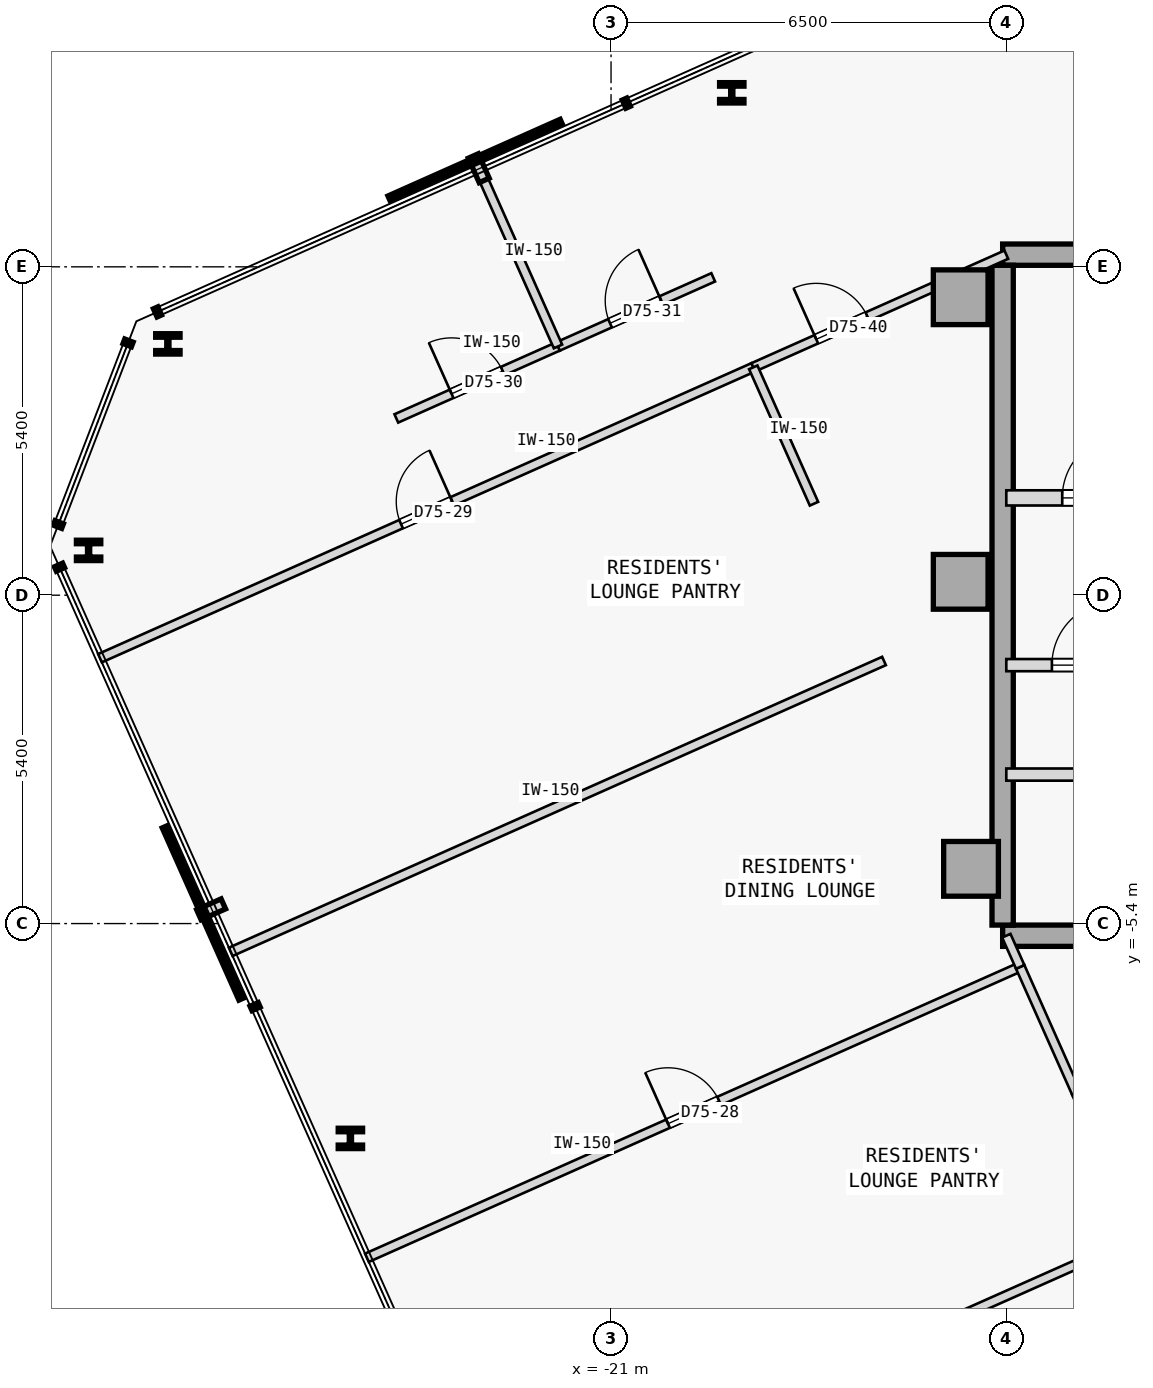
"""IFC4 building model, lengths in metres.
Left out: names, types, materials, properties, quantities, classifications, styles, units other than length and angle.
Written with IfcOpenShell. Run it as: python <this file> out.ifc"""

import sys

from ifc_helpers import new_model, si_unit, direction, frame, frame_2d, origin, origin_2d, place, context, subcontext, project, spatial, rectangle, i_section, extrude, element, fill, save


model = new_model("IFC4")
c1 = context("Model", 3, precision=1e-05, world=origin(), true_north=direction((0.0, 1.0)))
c2 = subcontext(c1, "Body", "Model", "MODEL_VIEW")
j1 = project(units=[si_unit("LENGTHUNIT", "METRE"), si_unit("PLANEANGLEUNIT", "RADIAN")], contexts=[c1])
p1 = place(None, origin())
s1 = spatial("IfcSite", under=j1, at=p1, CompositionType="ELEMENT")
p2 = place(p1, origin())
s2 = spatial("IfcBuilding", under=s1, at=p2, CompositionType="ELEMENT")
p3 = place(p2, frame((0.0, 0.0, 281.9)))
s3 = spatial("IfcBuildingStorey", under=s2, at=p3, CompositionType="ELEMENT", Elevation=281.9)
for number, where, z_axis, x_axis in (
    (1, (-15.25, 4.9, 0.0), (0.0, 0.0, 1.0), (1.0, 0.0, 0.0)),
    (2, (-15.25, 0.22, 0.0), (0.0, 0.0, 1.0), (1.0, 0.0, 0.0)),
    (3, (-15.08, -4.5, 0.0), (0.0, 0.0, 1.0), (1.0, 0.0, 0.0)),
):
    element("IfcColumn", number, at=place(p3, frame(where, z_axis=z_axis, x_axis=x_axis)), inside=s3, PredefinedType="COLUMN", context=c2, shape_type="SweptSolid", body=[
        extrude(rectangle(XDim=0.9, YDim=0.9, at=origin_2d()), origin(), (0.0, 0.0, 1.0), 3.35),
    ])
p4 = place(p3, frame((-14.56, 5.6, 0.0), z_axis=(0.0, 0.0, 1.0), x_axis=(1.0, 0.0, 0.0)))
e4 = element("IfcWall", 4, at=p4, inside=s3, PredefinedType="SHEAR", context=c2, shape_type="SweptSolid", body=[
    extrude(rectangle(XDim=11.41, YDim=0.35, at=frame_2d((5.705, 0.0))), origin(), (0.0, 0.0, 1.0), 3.125),
])
p5 = place(p3, frame((-14.56, -5.6, 0.0), z_axis=(0.0, 0.0, 1.0), x_axis=(1.0, 0.0, 0.0)))
e5 = element("IfcWall", 5, at=p5, inside=s3, PredefinedType="SHEAR", context=c2, shape_type="SweptSolid", body=[
    extrude(rectangle(XDim=10.86, YDim=0.35, at=frame_2d((5.43, 0.0))), origin(), (0.0, 0.0, 1.0), 3.125),
])
p6 = place(p3, frame((-14.56, -5.425, 0.0), z_axis=(0.0, 0.0, 1.0), x_axis=(0.0, 1.0, 0.0)))
e6 = element("IfcWall", 6, at=p6, inside=s3, PredefinedType="SHEAR", context=c2, shape_type="SweptSolid", body=[
    extrude(rectangle(XDim=10.85, YDim=0.35, at=frame_2d((5.425, 0.0))), origin(), (0.0, 0.0, 1.0), 3.125),
])
for number, where, z_axis, x_axis in (
    (7, (-19.015, 8.262, 0.0), (0.0, 0.0, 1.0), (1.0, 0.0, 0.0)),
    (8, (-28.288, 4.133, 0.0), (0.0, 0.0, 1.0), (1.0, 0.0, 0.0)),
    (9, (-29.592, 0.737, 0.0), (0.0, 0.0, 1.0), (1.0, 0.0, 0.0)),
    (10, (-25.286, -8.933, 0.0), (0.0, 0.0, 1.0), (1.0, 0.0, 0.0)),
):
    element("IfcColumn", number, at=place(p3, frame(where, z_axis=z_axis, x_axis=x_axis)), inside=s3, PredefinedType="COLUMN", context=c2, shape_type="SweptSolid", body=[
        extrude(i_section(OverallWidth=0.401, OverallDepth=0.335, WebThickness=0.036, FlangeThickness=0.058, FilletRadius=0.015, at=origin_2d()), origin(), (0.0, 0.0, 1.0), 3.35),
    ])
p7 = place(p3, frame((-14.5, 1.6, 0.0), z_axis=(0.0, 0.0, 1.0), x_axis=(1.0, 0.0, 0.0)))
e11 = element("IfcWall", 11, at=p7, inside=s3, PredefinedType="STANDARD", context=c2, shape_type="SweptSolid", body=[
    extrude(rectangle(XDim=3.6, YDim=0.25, at=frame_2d((1.8, 0.0))), origin(), (0.0, 0.0, 1.0), 3.125),
])
p8 = place(p7, frame((0.92, 0.0, 0.0)))
e12 = element("IfcOpeningElement", 12, at=p8, cuts=e11, PredefinedType="OPENING", context=c2, shape_type="SweptSolid", body=[
    extrude(rectangle(XDim=1.05, YDim=2.15, at=frame_2d((0.525, 1.075))), frame((0.0, 0.135, 0.0), z_axis=(0.0, -1.0, 0.0), x_axis=(1.0, 0.0, 0.0)), (0.0, 0.0, 1.0), 0.27),
])
p9 = place(p3, frame((-14.5, -1.15, 0.0), z_axis=(0.0, 0.0, 1.0), x_axis=(1.0, 0.0, 0.0)))
e13 = element("IfcWall", 13, at=p9, inside=s3, PredefinedType="STANDARD", context=c2, shape_type="SweptSolid", body=[
    extrude(rectangle(XDim=2.95, YDim=0.2, at=frame_2d((1.475, 0.0))), origin(), (0.0, 0.0, 1.0), 3.125),
])
p10 = place(p9, frame((0.75, 0.0, 0.0)))
e14 = element("IfcOpeningElement", 14, at=p10, cuts=e13, PredefinedType="OPENING", context=c2, shape_type="SweptSolid", body=[
    extrude(rectangle(XDim=1.05, YDim=2.18, at=frame_2d((0.525, 1.09))), frame((0.0, 0.11, 0.0), z_axis=(0.0, -1.0, 0.0), x_axis=(1.0, 0.0, 0.0)), (0.0, 0.0, 1.0), 0.22),
])
p11 = place(p3, frame((-14.5, -2.95, 0.0), z_axis=(0.0, 0.0, 1.0), x_axis=(1.0, 0.0, 0.0)))
e15 = element("IfcWall", 15, at=p11, inside=s3, PredefinedType="STANDARD", context=c2, shape_type="SweptSolid", body=[
    extrude(rectangle(XDim=10.8, YDim=0.2, at=frame_2d((5.4, 0.0))), origin(), (0.0, 0.0, 1.0), 3.125),
])
p12 = place(p11, frame((9.17, 0.0, 0.0)))
e16 = element("IfcOpeningElement", 16, at=p12, cuts=e15, PredefinedType="OPENING", context=c2, shape_type="SweptSolid", body=[
    extrude(rectangle(XDim=1.1, YDim=2.15, at=frame_2d((0.55, 1.075))), frame((0.0, 0.11, 0.0), z_axis=(0.0, -1.0, 0.0), x_axis=(1.0, 0.0, 0.0)), (0.0, 0.0, 1.0), 0.22),
])
p13 = place(p11, frame((2.33, 0.0, 0.0)))
e17 = element("IfcOpeningElement", 17, at=p13, cuts=e15, PredefinedType="OPENING", context=c2, shape_type="SweptSolid", body=[
    extrude(rectangle(XDim=0.92, YDim=2.15, at=frame_2d((0.46, 1.075))), frame((0.0, 0.11, 0.0), z_axis=(0.0, -1.0, 0.0), x_axis=(1.0, 0.0, 0.0)), (0.0, 0.0, 1.0), 0.22),
])
p14 = place(p11, frame((6.65, 0.0, 0.0)))
e18 = element("IfcOpeningElement", 18, at=p14, cuts=e15, PredefinedType="OPENING", context=c2, shape_type="SweptSolid", body=[
    extrude(rectangle(XDim=0.92, YDim=2.15, at=frame_2d((0.46, 1.075))), frame((0.0, 0.11, 0.0), z_axis=(0.0, -1.0, 0.0), x_axis=(1.0, 0.0, 0.0)), (0.0, 0.0, 1.0), 0.22),
])
p15 = place(p3, frame((-29.404, -1.036, 0.0), z_axis=(0.0, 0.0, 1.0), x_axis=(0.913544247064, 0.406739362069, 0.0)))
e19 = element("IfcWall", 19, at=p15, inside=s3, PredefinedType="PARTITIONING", context=c2, shape_type="SweptSolid", body=[
    extrude(rectangle(XDim=11.76, YDim=0.15, at=frame_2d((5.88, 0.0))), origin(), (0.0, 0.0, 1.0), 3.125),
])
p16 = place(p15, frame((5.42, 0.0, 0.0)))
e20 = element("IfcOpeningElement", 20, at=p16, cuts=e19, PredefinedType="OPENING", context=c2, shape_type="SweptSolid", body=[
    extrude(rectangle(XDim=0.92, YDim=2.15, at=frame_2d((0.46, 1.075))), frame((0.0, 0.085, 0.0), z_axis=(0.0, -1.0, 0.0), x_axis=(1.0, 0.0, 0.0)), (0.0, 0.0, 1.0), 0.17),
])
p17 = place(p3, frame((-24.531, 2.907, 0.0), z_axis=(0.0, 0.0, 1.0), x_axis=(0.913531130744, 0.406768820292, 0.0)))
e21 = element("IfcWall", 21, at=p17, inside=s3, PredefinedType="PARTITIONING", context=c2, shape_type="SweptSolid", body=[
    extrude(rectangle(XDim=2.91, YDim=0.15, at=frame_2d((1.455, 0.0))), origin(), (0.0, 0.0, 1.0), 3.125),
])
p18 = place(p17, frame((0.995, 0.0, 0.0)))
e22 = element("IfcOpeningElement", 22, at=p18, cuts=e21, PredefinedType="OPENING", context=c2, shape_type="SweptSolid", body=[
    extrude(rectangle(XDim=0.92, YDim=2.15, at=frame_2d((0.46, 1.075))), frame((0.0, 0.085, 0.0), z_axis=(0.0, -1.0, 0.0), x_axis=(1.0, 0.0, 0.0)), (0.0, 0.0, 1.0), 0.17),
])
p19 = place(p3, frame((-21.872, 4.091, 0.0), z_axis=(0.0, 0.0, 1.0), x_axis=(0.913559116966, 0.406705962346, 0.0)))
e23 = element("IfcWall", 23, at=p19, inside=s3, PredefinedType="PARTITIONING", context=c2, shape_type="SweptSolid", body=[
    extrude(rectangle(XDim=2.794, YDim=0.15, at=frame_2d((1.397, 0.0))), origin(), (0.0, 0.0, 1.0), 3.125),
])
p20 = place(p19, frame((0.937, 0.0, 0.0)))
e24 = element("IfcOpeningElement", 24, at=p20, cuts=e23, PredefinedType="OPENING", context=c2, shape_type="SweptSolid", body=[
    extrude(rectangle(XDim=0.92, YDim=2.15, at=frame_2d((0.46, 1.075))), frame((0.0, 0.085, 0.0), z_axis=(0.0, -1.0, 0.0), x_axis=(1.0, 0.0, 0.0)), (0.0, 0.0, 1.0), 0.17),
])
p21 = place(p3, frame((-18.661, 3.747, 0.0), z_axis=(0.0, 0.0, 1.0), x_axis=(0.913535055583, 0.40676000568, 0.0)))
e25 = element("IfcWall", 25, at=p21, inside=s3, PredefinedType="PARTITIONING", context=c2, shape_type="SweptSolid", body=[
    extrude(rectangle(XDim=4.555, YDim=0.15, at=frame_2d((2.277, 0.0))), origin(), (0.0, 0.0, 1.0), 3.125),
])
p22 = place(p21, frame((1.134, 0.0, 0.0)))
e26 = element("IfcOpeningElement", 26, at=p22, cuts=e25, PredefinedType="OPENING", context=c2, shape_type="SweptSolid", body=[
    extrude(rectangle(XDim=0.92, YDim=2.15, at=frame_2d((0.46, 1.075))), frame((0.0, 0.085, 0.0), z_axis=(0.0, -1.0, 0.0), x_axis=(1.0, 0.0, 0.0)), (0.0, 0.0, 1.0), 0.17),
])
p23 = place(p3, frame((-23.043, -15.323, 0.0), z_axis=(0.0, 0.0, 1.0), x_axis=(0.913547681516, 0.406731648137, 0.0)))
e27 = element("IfcWall", 27, at=p23, inside=s3, PredefinedType="PARTITIONING", context=c2, shape_type="SweptSolid", body=[
    extrude(rectangle(XDim=11.76, YDim=0.15, at=frame_2d((5.88, 0.0))), origin(), (0.0, 0.0, 1.0), 3.125),
])
p24 = place(p23, frame((5.42, 0.0, 0.0)))
e28 = element("IfcOpeningElement", 28, at=p24, cuts=e27, PredefinedType="OPENING", context=c2, shape_type="SweptSolid", body=[
    extrude(rectangle(XDim=0.92, YDim=2.15, at=frame_2d((0.46, 1.075))), frame((0.0, 0.085, 0.0), z_axis=(0.0, -1.0, 0.0), x_axis=(1.0, 0.0, 0.0)), (0.0, 0.0, 1.0), 0.17),
])
p25 = place(p3, frame((-25.014, -10.896, 0.0), z_axis=(0.0, 0.0, 1.0), x_axis=(0.913544247064, 0.406739362069, 0.0)))
e29 = element("IfcWall", 29, at=p25, inside=s3, PredefinedType="PARTITIONING", context=c2, shape_type="SweptSolid", body=[
    extrude(rectangle(XDim=11.76, YDim=0.15, at=frame_2d((5.88, 0.0))), origin(), (0.0, 0.0, 1.0), 3.125),
])
p26 = place(p25, frame((5.42, 0.0, 0.0)))
e30 = element("IfcOpeningElement", 30, at=p26, cuts=e29, PredefinedType="OPENING", context=c2, shape_type="SweptSolid", body=[
    extrude(rectangle(XDim=0.92, YDim=2.15, at=frame_2d((0.46, 1.075))), frame((0.0, 0.085, 0.0), z_axis=(0.0, -1.0, 0.0), x_axis=(1.0, 0.0, 0.0)), (0.0, 0.0, 1.0), 0.17),
])
p27 = place(p3, frame((-12.3, -10.54, 0.0), z_axis=(0.0, 0.0, 1.0), x_axis=(-0.406788806475, 0.913522231216, 0.0)))
e31 = element("IfcWall", 31, at=p27, inside=s3, PredefinedType="PARTITIONING", context=c2, shape_type="SweptSolid", body=[
    extrude(rectangle(XDim=2.577, YDim=0.15, at=frame_2d((1.289, 0.0))), origin(), (0.0, 0.0, 1.0), 3.125),
])
p28 = place(p3, frame((-13.348, -8.186, 0.0), z_axis=(0.0, 0.0, 1.0), x_axis=(-0.40673740295, 0.913545119324, 0.0)))
e32 = element("IfcWall", 32, at=p28, inside=s3, PredefinedType="PARTITIONING", context=c2, shape_type="SweptSolid", body=[
    extrude(rectangle(XDim=2.269, YDim=0.15, at=frame_2d((1.134, 0.0))), origin(), (0.0, 0.0, 1.0), 3.125),
])
p29 = place(p3, frame((-27.254, -5.865, 0.0), z_axis=(0.0, 0.0, 1.0), x_axis=(0.913547681516, 0.406731648137, 0.0)))
e33 = element("IfcWall", 33, at=p29, inside=s3, PredefinedType="PARTITIONING", context=c2, shape_type="SweptSolid", body=[
    extrude(rectangle(XDim=11.76, YDim=0.15, at=frame_2d((5.88, 0.0))), origin(), (0.0, 0.0, 1.0), 3.125),
])
p30 = place(p3, frame((-14.271, -6.113, 0.0), z_axis=(0.0, 0.0, 1.0), x_axis=(-0.406622099206, 0.913596447255, 0.0)))
e34 = element("IfcWall", 34, at=p30, inside=s3, PredefinedType="PARTITIONING", context=c2, shape_type="SweptSolid", body=[
    extrude(rectangle(XDim=0.562, YDim=0.15, at=frame_2d((0.281, 0.0))), origin(), (0.0, 0.0, 1.0), 3.125),
])
p31 = place(p3, frame((-17.663, 1.504, 0.0), z_axis=(0.0, 0.0, 1.0), x_axis=(-0.406747374275, 0.913540679729, 0.0)))
e35 = element("IfcWall", 35, at=p31, inside=s3, PredefinedType="PARTITIONING", context=c2, shape_type="SweptSolid", body=[
    extrude(rectangle(XDim=2.455, YDim=0.15, at=frame_2d((1.228, 0.0))), origin(), (0.0, 0.0, 1.0), 3.125),
])
p32 = place(p3, frame((-21.872, 4.091, 0.0), z_axis=(0.0, 0.0, 1.0), x_axis=(-0.406761717745, 0.913534293268, 0.0)))
e36 = element("IfcWall", 36, at=p32, inside=s3, PredefinedType="PARTITIONING", context=c2, shape_type="SweptSolid", body=[
    extrude(rectangle(XDim=3.198, YDim=0.15, at=frame_2d((1.599, 0.0))), origin(), (0.0, 0.0, 1.0), 3.125),
])
p33 = place(p8, origin())
e37 = element("IfcDoor", 37, at=p33, inside=s3, OperationType="SINGLE_SWING_RIGHT", PredefinedType="DOOR", context=c2, shape_type="SweptSolid", body=[
    extrude(rectangle(XDim=1.05, YDim=2.15, at=frame_2d((0.525, 1.075))), frame((0.0, 0.025, 0.0), z_axis=(0.0, -1.0, 0.0), x_axis=(1.0, 0.0, 0.0)), (0.0, 0.0, 1.0), 0.05),
])
fill(e12, e37)
p34 = place(p10, origin())
e38 = element("IfcDoor", 38, at=p34, inside=s3, OperationType="SINGLE_SWING_RIGHT", PredefinedType="DOOR", context=c2, shape_type="SweptSolid", body=[
    extrude(rectangle(XDim=1.05, YDim=2.18, at=frame_2d((0.525, 1.09))), frame((0.0, 0.025, 0.0), z_axis=(0.0, -1.0, 0.0), x_axis=(1.0, 0.0, 0.0)), (0.0, 0.0, 1.0), 0.05),
])
fill(e14, e38)
p35 = place(p26, origin())
e39 = element("IfcDoor", 39, at=p35, inside=s3, OperationType="SINGLE_SWING_LEFT", PredefinedType="DOOR", context=c2, shape_type="SweptSolid", body=[
    extrude(rectangle(XDim=0.92, YDim=2.15, at=frame_2d((0.46, 1.075))), frame((0.0, 0.025, 0.0), z_axis=(0.0, -1.0, 0.0), x_axis=(1.0, 0.0, 0.0)), (0.0, 0.0, 1.0), 0.05),
])
fill(e30, e39)
p36 = place(p16, origin())
e40 = element("IfcDoor", 40, at=p36, inside=s3, OperationType="SINGLE_SWING_RIGHT", PredefinedType="DOOR", context=c2, shape_type="SweptSolid", body=[
    extrude(rectangle(XDim=0.92, YDim=2.15, at=frame_2d((0.46, 1.075))), frame((0.0, 0.025, 0.0), z_axis=(0.0, -1.0, 0.0), x_axis=(1.0, 0.0, 0.0)), (0.0, 0.0, 1.0), 0.05),
])
fill(e20, e40)
p37 = place(p18, origin())
e41 = element("IfcDoor", 41, at=p37, inside=s3, OperationType="SINGLE_SWING_LEFT", PredefinedType="DOOR", context=c2, shape_type="SweptSolid", body=[
    extrude(rectangle(XDim=0.92, YDim=2.15, at=frame_2d((0.46, 1.075))), frame((0.0, 0.025, 0.0), z_axis=(0.0, -1.0, 0.0), x_axis=(1.0, 0.0, 0.0)), (0.0, 0.0, 1.0), 0.05),
])
fill(e22, e41)
p38 = place(p20, origin())
e42 = element("IfcDoor", 42, at=p38, inside=s3, OperationType="SINGLE_SWING_RIGHT", PredefinedType="DOOR", context=c2, shape_type="SweptSolid", body=[
    extrude(rectangle(XDim=0.92, YDim=2.15, at=frame_2d((0.46, 1.075))), frame((0.0, 0.025, 0.0), z_axis=(0.0, -1.0, 0.0), x_axis=(1.0, 0.0, 0.0)), (0.0, 0.0, 1.0), 0.05),
])
fill(e24, e42)
p39 = place(p22, origin())
e43 = element("IfcDoor", 43, at=p39, inside=s3, OperationType="SINGLE_SWING_LEFT", PredefinedType="DOOR", context=c2, shape_type="SweptSolid", body=[
    extrude(rectangle(XDim=0.92, YDim=2.15, at=frame_2d((0.46, 1.075))), frame((0.0, 0.025, 0.0), z_axis=(0.0, -1.0, 0.0), x_axis=(1.0, 0.0, 0.0)), (0.0, 0.0, 1.0), 0.05),
])
fill(e26, e43)
save(model, sys.argv[1])
